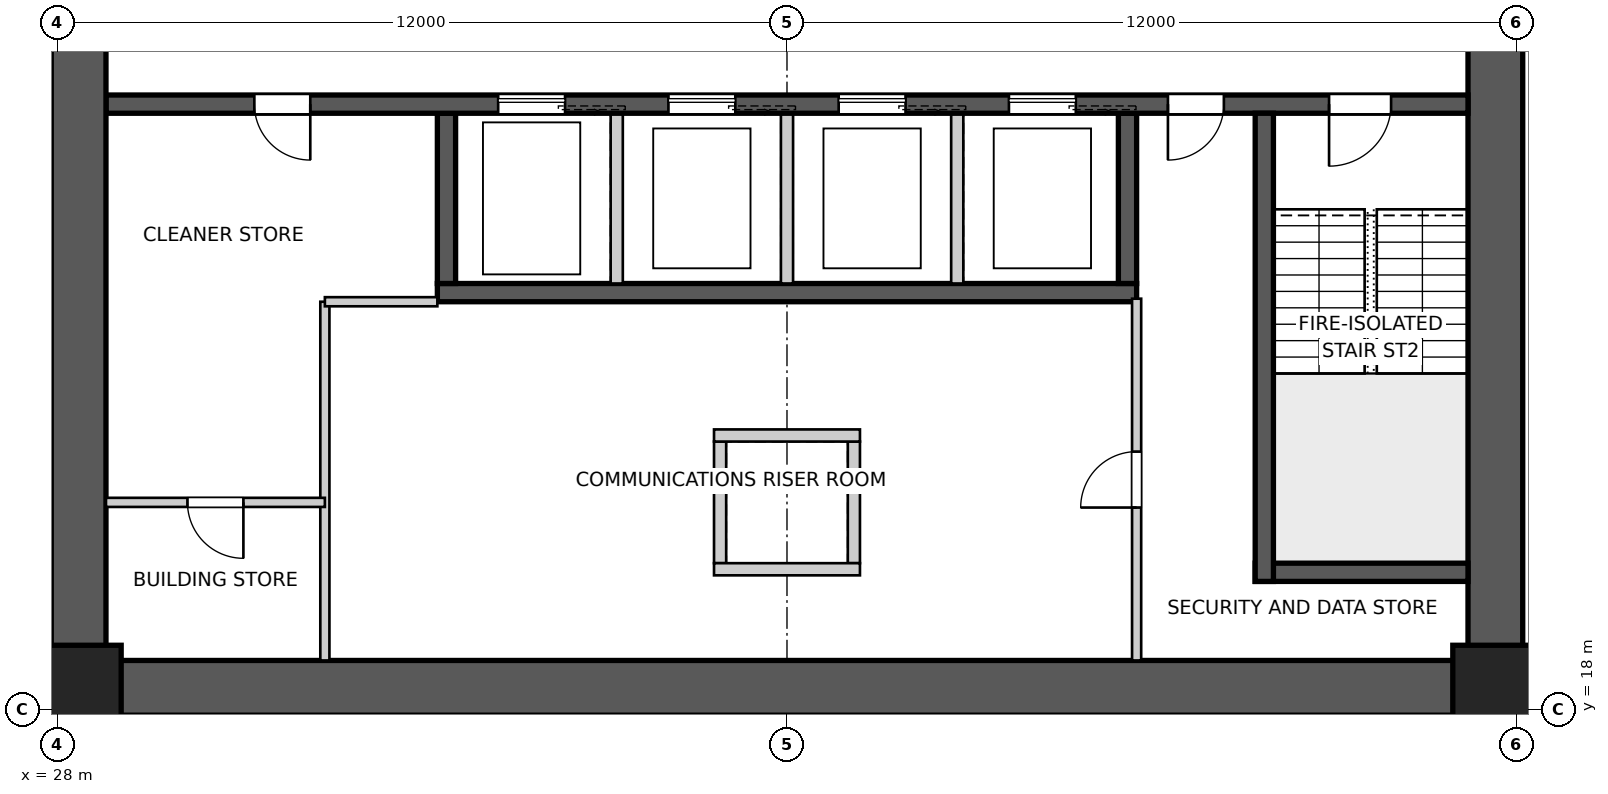
"""IFC4 building model, lengths in metres.
Left out: names, types, materials, properties, quantities, classifications, styles, units other than length and angle.
Written with IfcOpenShell. Run it as: python <this file> out.ifc"""

import sys

from ifc_helpers import new_model, si_unit, direction, frame, frame_2d, origin, origin_2d, place, context, subcontext, project, spatial, polyline, rectangle, outline, extrude, element, fill, save


model = new_model("IFC4")
c1 = context("Model", 3, precision=1e-05, world=origin(), true_north=direction((0.0, 1.0)))
c2 = subcontext(c1, "Body", "Model", "MODEL_VIEW")
j1 = project(units=[si_unit("LENGTHUNIT", "METRE"), si_unit("PLANEANGLEUNIT", "RADIAN")], contexts=[c1])
p1 = place(None, origin())
s1 = spatial("IfcSite", under=j1, at=p1, CompositionType="ELEMENT")
p2 = place(p1, origin())
s2 = spatial("IfcBuilding", under=s1, at=p2, CompositionType="ELEMENT")
p3 = place(p2, frame((0.0, 0.0, -3.7)))
s3 = spatial("IfcBuildingStorey", under=s2, at=p3, CompositionType="ELEMENT", Elevation=-3.7)
p4 = place(p3, frame((51.2, 18.35, 0.0), z_axis=(0.0, 0.0, 1.0), x_axis=(-1.0, 0.0, 0.0)))
e1 = element("IfcWall", 1, at=p4, inside=s3, PredefinedType="SHEAR", context=c2, shape_type="SweptSolid", body=[
    extrude(outline(polyline([(0.0, -0.45), (22.4, -0.45), (22.4, -0.025), (22.85, -0.025), (22.85, 0.025), (22.4, 0.025), (22.4, 0.45), (0.0, 0.45), (0.0, 0.025), (-0.45, 0.025), (-0.45, -0.025), (0.0, -0.025), (0.0, -0.45)])), origin(), (0.0, 0.0, 1.0), 3.7),
])
p5 = place(p3, frame((51.65, 18.8, 0.0), z_axis=(0.0, 0.0, 1.0), x_axis=(0.0, 1.0, 0.0)))
e2 = element("IfcWall", 2, at=p5, inside=s3, PredefinedType="SHEAR", context=c2, shape_type="SweptSolid", body=[
    extrude(outline(polyline([(0.0, -0.45), (22.4, -0.45), (22.4, -0.025), (22.85, -0.025), (22.85, 0.025), (22.4, 0.025), (22.4, 0.45), (0.0, 0.45), (0.0, 0.025), (-0.45, 0.025), (-0.45, -0.025), (0.0, -0.025), (0.0, -0.45)])), origin(), (0.0, 0.0, 1.0), 3.7),
])
p6 = place(p5, frame((11.14, 0.0, 0.0)))
e3 = element("IfcOpeningElement", 3, at=p6, cuts=e2, PredefinedType="OPENING", context=c2, shape_type="SweptSolid", body=[
    extrude(rectangle(XDim=1.02, YDim=2.4, at=frame_2d((0.51, 1.2))), frame((0.0, 0.46, 0.0), z_axis=(0.0, -1.0, 0.0), x_axis=(1.0, 0.0, 0.0)), (0.0, 0.0, 1.0), 0.92),
])
p7 = place(p3, frame((28.35, 41.2, 0.0), z_axis=(0.0, 0.0, 1.0), x_axis=(0.0, -1.0, 0.0)))
e4 = element("IfcWall", 4, at=p7, inside=s3, PredefinedType="SHEAR", context=c2, shape_type="SweptSolid", body=[
    extrude(outline(polyline([(0.0, -0.45), (22.4, -0.45), (22.4, -0.025), (22.85, -0.025), (22.85, 0.025), (22.4, 0.025), (22.4, 0.45), (0.0, 0.45), (0.0, 0.025), (-0.45, 0.025), (-0.45, -0.025), (0.0, -0.025), (0.0, -0.45)])), origin(), (0.0, 0.0, 1.0), 3.7),
])
p8 = place(p7, frame((11.14, 0.0, 0.0)))
e5 = element("IfcOpeningElement", 5, at=p8, cuts=e4, PredefinedType="OPENING", context=c2, shape_type="SweptSolid", body=[
    extrude(rectangle(XDim=1.02, YDim=2.4, at=frame_2d((0.51, 1.2))), frame((0.0, 0.46, 0.0), z_axis=(0.0, -1.0, 0.0), x_axis=(1.0, 0.0, 0.0)), (0.0, 0.0, 1.0), 0.92),
])
p9 = place(p3, frame((51.2, 27.95, 0.0), z_axis=(0.0, 0.0, 1.0), x_axis=(-1.0, 0.0, 0.0)))
e6 = element("IfcWall", 6, at=p9, inside=s3, PredefinedType="SHEAR", context=c2, shape_type="SweptSolid", body=[
    extrude(rectangle(XDim=22.4, YDim=0.3, at=frame_2d((11.2, 0.0))), origin(), (0.0, 0.0, 1.0), 3.7),
])
p10 = place(p9, frame((19.04, 0.0, 0.0)))
e7 = element("IfcOpeningElement", 7, at=p10, cuts=e6, PredefinedType="OPENING", context=c2, shape_type="SweptSolid", body=[
    extrude(rectangle(XDim=0.92, YDim=2.1, at=frame_2d((0.46, 1.05))), frame((0.0, 0.16, 0.0), z_axis=(0.0, -1.0, 0.0), x_axis=(1.0, 0.0, 0.0)), (0.0, 0.0, 1.0), 0.32),
])
p11 = place(p9, frame((1.265, 0.0, 0.0)))
e8 = element("IfcOpeningElement", 8, at=p11, cuts=e6, PredefinedType="OPENING", context=c2, shape_type="SweptSolid", body=[
    extrude(rectangle(XDim=1.02, YDim=2.1, at=frame_2d((0.51, 1.05))), frame((0.0, 0.16, 0.0), z_axis=(0.0, -1.0, 0.0), x_axis=(1.0, 0.0, 0.0)), (0.0, 0.0, 1.0), 0.32),
])
p12 = place(p9, frame((4.015, 0.0, 0.0)))
e9 = element("IfcOpeningElement", 9, at=p12, cuts=e6, PredefinedType="OPENING", context=c2, shape_type="SweptSolid", body=[
    extrude(rectangle(XDim=0.92, YDim=2.1, at=frame_2d((0.46, 1.05))), frame((0.0, 0.16, 0.0), z_axis=(0.0, -1.0, 0.0), x_axis=(1.0, 0.0, 0.0)), (0.0, 0.0, 1.0), 0.32),
])
p13 = place(p9, frame((6.45, 0.0, 0.0)))
e10 = element("IfcOpeningElement", 10, at=p13, cuts=e6, PredefinedType="OPENING", context=c2, shape_type="SweptSolid", body=[
    extrude(rectangle(XDim=1.1, YDim=2.1, at=frame_2d((0.55, 1.05))), frame((0.0, 0.16, 0.0), z_axis=(0.0, -1.0, 0.0), x_axis=(1.0, 0.0, 0.0)), (0.0, 0.0, 1.0), 0.32),
])
p14 = place(p9, frame((9.25, 0.0, 0.0)))
e11 = element("IfcOpeningElement", 11, at=p14, cuts=e6, PredefinedType="OPENING", context=c2, shape_type="SweptSolid", body=[
    extrude(rectangle(XDim=1.1, YDim=2.1, at=frame_2d((0.55, 1.05))), frame((0.0, 0.16, 0.0), z_axis=(0.0, -1.0, 0.0), x_axis=(1.0, 0.0, 0.0)), (0.0, 0.0, 1.0), 0.32),
])
p15 = place(p9, frame((12.05, 0.0, 0.0)))
e12 = element("IfcOpeningElement", 12, at=p15, cuts=e6, PredefinedType="OPENING", context=c2, shape_type="SweptSolid", body=[
    extrude(rectangle(XDim=1.1, YDim=2.1, at=frame_2d((0.55, 1.05))), frame((0.0, 0.16, 0.0), z_axis=(0.0, -1.0, 0.0), x_axis=(1.0, 0.0, 0.0)), (0.0, 0.0, 1.0), 0.32),
])
p16 = place(p9, frame((14.85, 0.0, 0.0)))
e13 = element("IfcOpeningElement", 13, at=p16, cuts=e6, PredefinedType="OPENING", context=c2, shape_type="SweptSolid", body=[
    extrude(rectangle(XDim=1.1, YDim=2.1, at=frame_2d((0.55, 1.05))), frame((0.0, 0.16, 0.0), z_axis=(0.0, -1.0, 0.0), x_axis=(1.0, 0.0, 0.0)), (0.0, 0.0, 1.0), 0.32),
])
p17 = place(p3, frame((45.75, 24.85, 0.0), z_axis=(0.0, 0.0, 1.0), x_axis=(-1.0, 0.0, 0.0)))
e14 = element("IfcWall", 14, at=p17, inside=s3, PredefinedType="SHEAR", context=c2, shape_type="SweptSolid", body=[
    extrude(rectangle(XDim=11.5, YDim=0.3, at=frame_2d((5.75, 0.0))), origin(), (0.0, 0.0, 1.0), 3.7),
])
p18 = place(p3, frame((45.6, 27.8, 0.0), z_axis=(0.0, 0.0, 1.0), x_axis=(0.0, -1.0, 0.0)))
e15 = element("IfcWall", 15, at=p18, inside=s3, PredefinedType="SHEAR", context=c2, shape_type="SweptSolid", body=[
    extrude(rectangle(XDim=2.8, YDim=0.3, at=frame_2d((1.4, 0.0))), origin(), (0.0, 0.0, 1.0), 3.7),
])
for number, where, z_axis, x_axis in (
    (16, (42.8, 27.8, 0.0), (0.0, 0.0, 1.0), (0.0, -1.0, 0.0)),
    (17, (40.0, 27.8, 0.0), (0.0, 0.0, 1.0), (0.0, -1.0, 0.0)),
    (18, (37.2, 27.8, 0.0), (0.0, 0.0, 1.0), (0.0, -1.0, 0.0)),
):
    element("IfcWall", number, at=place(p3, frame(where, z_axis=z_axis, x_axis=x_axis)), inside=s3, PredefinedType="SOLIDWALL", context=c2, shape_type="SweptSolid", body=[
        extrude(rectangle(XDim=2.8, YDim=0.2, at=frame_2d((1.4, 0.0))), origin(), (0.0, 0.0, 1.0), 3.7),
    ])
p19 = place(p3, frame((34.4, 27.8, 0.0), z_axis=(0.0, 0.0, 1.0), x_axis=(0.0, -1.0, 0.0)))
e19 = element("IfcWall", 19, at=p19, inside=s3, PredefinedType="SHEAR", context=c2, shape_type="SweptSolid", body=[
    extrude(rectangle(XDim=2.8, YDim=0.3, at=frame_2d((1.4, 0.0))), origin(), (0.0, 0.0, 1.0), 3.7),
])
p20 = place(p3, frame((47.85, 27.8, 0.0), z_axis=(0.0, 0.0, 1.0), x_axis=(0.0, -1.0, 0.0)))
e20 = element("IfcWall", 20, at=p20, inside=s3, PredefinedType="SHEAR", context=c2, shape_type="SweptSolid", body=[
    extrude(rectangle(XDim=7.7, YDim=0.3, at=frame_2d((3.85, 0.0))), origin(), (0.0, 0.0, 1.0), 3.7),
])
p21 = place(p3, frame((51.2, 20.25, 0.0), z_axis=(0.0, 0.0, 1.0), x_axis=(-1.0, 0.0, 0.0)))
e21 = element("IfcWall", 21, at=p21, inside=s3, PredefinedType="SHEAR", context=c2, shape_type="SweptSolid", body=[
    extrude(rectangle(XDim=3.5, YDim=0.3, at=frame_2d((1.75, 0.0))), origin(), (0.0, 0.0, 1.0), 3.7),
])
for number, where, z_axis, x_axis in (
    (22, (38.9, 22.4, 0.0), (0.0, 0.0, 1.0), (0.0, -1.0, 0.0)),
    (23, (41.1, 22.4, 0.0), (0.0, 0.0, 1.0), (0.0, -1.0, 0.0)),
):
    element("IfcWall", number, at=place(p3, frame(where, z_axis=z_axis, x_axis=x_axis)), inside=s3, PredefinedType="SOLIDWALL", context=c2, shape_type="SweptSolid", body=[
        extrude(rectangle(XDim=2.0, YDim=0.2, at=frame_2d((1.0, 0.0))), origin(), (0.0, 0.0, 1.0), 3.7),
    ])
for number, where, z_axis, x_axis in (
    (24, (38.8, 22.5, 0.0), (0.0, 0.0, 1.0), (1.0, 0.0, 0.0)),
    (25, (38.8, 20.3, 0.0), (0.0, 0.0, 1.0), (1.0, 0.0, 0.0)),
):
    element("IfcWall", number, at=place(p3, frame(where, z_axis=z_axis, x_axis=x_axis)), inside=s3, PredefinedType="SOLIDWALL", context=c2, shape_type="SweptSolid", body=[
        extrude(rectangle(XDim=2.4, YDim=0.2, at=frame_2d((1.2, 0.0))), origin(), (0.0, 0.0, 1.0), 3.7),
    ])
for number, where, z_axis, x_axis in (
    (26, (28.35, 18.35, 0.0), (0.0, 0.0, 1.0), (1.0, 0.0, 0.0)),
    (27, (51.65, 18.35, 0.0), (0.0, 0.0, 1.0), (1.0, 0.0, 0.0)),
):
    element("IfcColumn", number, at=place(p3, frame(where, z_axis=z_axis, x_axis=x_axis)), inside=s3, PredefinedType="COLUMN", context=c2, shape_type="SweptSolid", body=[
        extrude(rectangle(XDim=1.4, YDim=1.4, at=origin_2d()), origin(), (0.0, 0.0, 1.0), 3.7),
    ])
p22 = place(p3, frame((45.75, 18.8, 0.0), z_axis=(0.0, 0.0, 1.0), x_axis=(0.0, 1.0, 0.0)))
e28 = element("IfcWall", 28, at=p22, inside=s3, PredefinedType="SOLIDWALL", context=c2, shape_type="SweptSolid", body=[
    extrude(rectangle(XDim=5.95, YDim=0.15, at=frame_2d((2.975, 0.0))), origin(), (0.0, 0.0, 1.0), 3.35),
])
p23 = place(p22, frame((2.515, 0.0, 0.0)))
e29 = element("IfcOpeningElement", 29, at=p23, cuts=e28, PredefinedType="OPENING", context=c2, shape_type="SweptSolid", body=[
    extrude(rectangle(XDim=0.92, YDim=2.1, at=frame_2d((0.46, 1.05))), frame((0.0, 0.085, 0.0), z_axis=(0.0, -1.0, 0.0), x_axis=(1.0, 0.0, 0.0)), (0.0, 0.0, 1.0), 0.17),
])
p24 = place(p3, frame((32.4, 18.8, 0.0), z_axis=(0.0, 0.0, 1.0), x_axis=(0.0, 1.0, 0.0)))
e30 = element("IfcWall", 30, at=p24, inside=s3, PredefinedType="SOLIDWALL", context=c2, shape_type="SweptSolid", body=[
    extrude(rectangle(XDim=5.9, YDim=0.15, at=frame_2d((2.95, 0.0))), origin(), (0.0, 0.0, 1.0), 3.35),
])
p25 = place(p3, frame((32.4, 24.7, 0.0), z_axis=(0.0, 0.0, 1.0), x_axis=(1.0, 0.0, 0.0)))
e31 = element("IfcWall", 31, at=p25, inside=s3, PredefinedType="SOLIDWALL", context=c2, shape_type="SweptSolid", body=[
    extrude(rectangle(XDim=1.85, YDim=0.15, at=frame_2d((0.925, 0.0))), origin(), (0.0, 0.0, 1.0), 3.35),
])
p26 = place(p3, frame((32.4, 21.4, 0.0), z_axis=(0.0, 0.0, 1.0), x_axis=(-1.0, 0.0, 0.0)))
e32 = element("IfcWall", 32, at=p26, inside=s3, PredefinedType="SOLIDWALL", context=c2, shape_type="SweptSolid", body=[
    extrude(rectangle(XDim=3.6, YDim=0.15, at=frame_2d((1.8, 0.0))), origin(), (0.0, 0.0, 1.0), 3.35),
])
p27 = place(p26, frame((1.34, 0.0, 0.0)))
e33 = element("IfcOpeningElement", 33, at=p27, cuts=e32, PredefinedType="OPENING", context=c2, shape_type="SweptSolid", body=[
    extrude(rectangle(XDim=0.92, YDim=2.1, at=frame_2d((0.46, 1.05))), frame((0.0, 0.085, 0.0), z_axis=(0.0, -1.0, 0.0), x_axis=(1.0, 0.0, 0.0)), (0.0, 0.0, 1.0), 0.17),
])
p28 = place(p10, origin())
e34 = element("IfcDoor", 34, at=p28, inside=s3, OperationType="SINGLE_SWING_LEFT", PredefinedType="DOOR", context=c2, shape_type="SweptSolid", body=[
    extrude(rectangle(XDim=0.92, YDim=2.1, at=frame_2d((0.46, 1.05))), frame((0.0, 0.025, 0.0), z_axis=(0.0, -1.0, 0.0), x_axis=(1.0, 0.0, 0.0)), (0.0, 0.0, 1.0), 0.05),
])
fill(e7, e34)
p29 = place(p11, origin())
e35 = element("IfcDoor", 35, at=p29, inside=s3, OperationType="SINGLE_SWING_RIGHT", PredefinedType="DOOR", context=c2, shape_type="SweptSolid", body=[
    extrude(rectangle(XDim=1.02, YDim=2.1, at=frame_2d((0.51, 1.05))), frame((0.0, 0.025, 0.0), z_axis=(0.0, -1.0, 0.0), x_axis=(1.0, 0.0, 0.0)), (0.0, 0.0, 1.0), 0.05),
])
fill(e8, e35)
p30 = place(p12, origin())
e36 = element("IfcDoor", 36, at=p30, inside=s3, OperationType="SINGLE_SWING_RIGHT", PredefinedType="DOOR", context=c2, shape_type="SweptSolid", body=[
    extrude(rectangle(XDim=0.92, YDim=2.1, at=frame_2d((0.46, 1.05))), frame((0.0, 0.025, 0.0), z_axis=(0.0, -1.0, 0.0), x_axis=(1.0, 0.0, 0.0)), (0.0, 0.0, 1.0), 0.05),
])
fill(e9, e36)
p31 = place(p27, origin())
e37 = element("IfcDoor", 37, at=p31, inside=s3, OperationType="SINGLE_SWING_LEFT", PredefinedType="DOOR", context=c2, shape_type="SweptSolid", body=[
    extrude(rectangle(XDim=0.92, YDim=2.1, at=frame_2d((0.46, 1.05))), frame((0.0, 0.025, 0.0), z_axis=(0.0, -1.0, 0.0), x_axis=(1.0, 0.0, 0.0)), (0.0, 0.0, 1.0), 0.05),
])
fill(e33, e37)
p32 = place(p23, origin())
e38 = element("IfcDoor", 38, at=p32, inside=s3, OperationType="SINGLE_SWING_LEFT", PredefinedType="DOOR", context=c2, shape_type="SweptSolid", body=[
    extrude(rectangle(XDim=0.92, YDim=2.1, at=frame_2d((0.46, 1.05))), frame((0.0, 0.025, 0.0), z_axis=(0.0, -1.0, 0.0), x_axis=(1.0, 0.0, 0.0)), (0.0, 0.0, 1.0), 0.05),
])
fill(e29, e38)
p33 = place(p13, origin())
e39 = element("IfcDoor", 39, at=p33, inside=s3, OperationType="SLIDING_TO_LEFT", PredefinedType="DOOR", context=c2, shape_type="SweptSolid", body=[
    extrude(rectangle(XDim=1.1, YDim=2.1, at=frame_2d((0.55, 1.05))), frame((0.0, 0.025, 0.0), z_axis=(0.0, -1.0, 0.0), x_axis=(1.0, 0.0, 0.0)), (0.0, 0.0, 1.0), 0.05),
])
fill(e10, e39)
p34 = place(p14, origin())
e40 = element("IfcDoor", 40, at=p34, inside=s3, OperationType="SLIDING_TO_LEFT", PredefinedType="DOOR", context=c2, shape_type="SweptSolid", body=[
    extrude(rectangle(XDim=1.1, YDim=2.1, at=frame_2d((0.55, 1.05))), frame((0.0, 0.025, 0.0), z_axis=(0.0, -1.0, 0.0), x_axis=(1.0, 0.0, 0.0)), (0.0, 0.0, 1.0), 0.05),
])
fill(e11, e40)
p35 = place(p15, origin())
e41 = element("IfcDoor", 41, at=p35, inside=s3, OperationType="SLIDING_TO_LEFT", PredefinedType="DOOR", context=c2, shape_type="SweptSolid", body=[
    extrude(rectangle(XDim=1.1, YDim=2.1, at=frame_2d((0.55, 1.05))), frame((0.0, 0.025, 0.0), z_axis=(0.0, -1.0, 0.0), x_axis=(1.0, 0.0, 0.0)), (0.0, 0.0, 1.0), 0.05),
])
fill(e12, e41)
p36 = place(p16, origin())
e42 = element("IfcDoor", 42, at=p36, inside=s3, OperationType="SLIDING_TO_LEFT", PredefinedType="DOOR", context=c2, shape_type="SweptSolid", body=[
    extrude(rectangle(XDim=1.1, YDim=2.1, at=frame_2d((0.55, 1.05))), frame((0.0, 0.025, 0.0), z_axis=(0.0, -1.0, 0.0), x_axis=(1.0, 0.0, 0.0)), (0.0, 0.0, 1.0), 0.05),
])
fill(e13, e42)
save(model, sys.argv[1])
